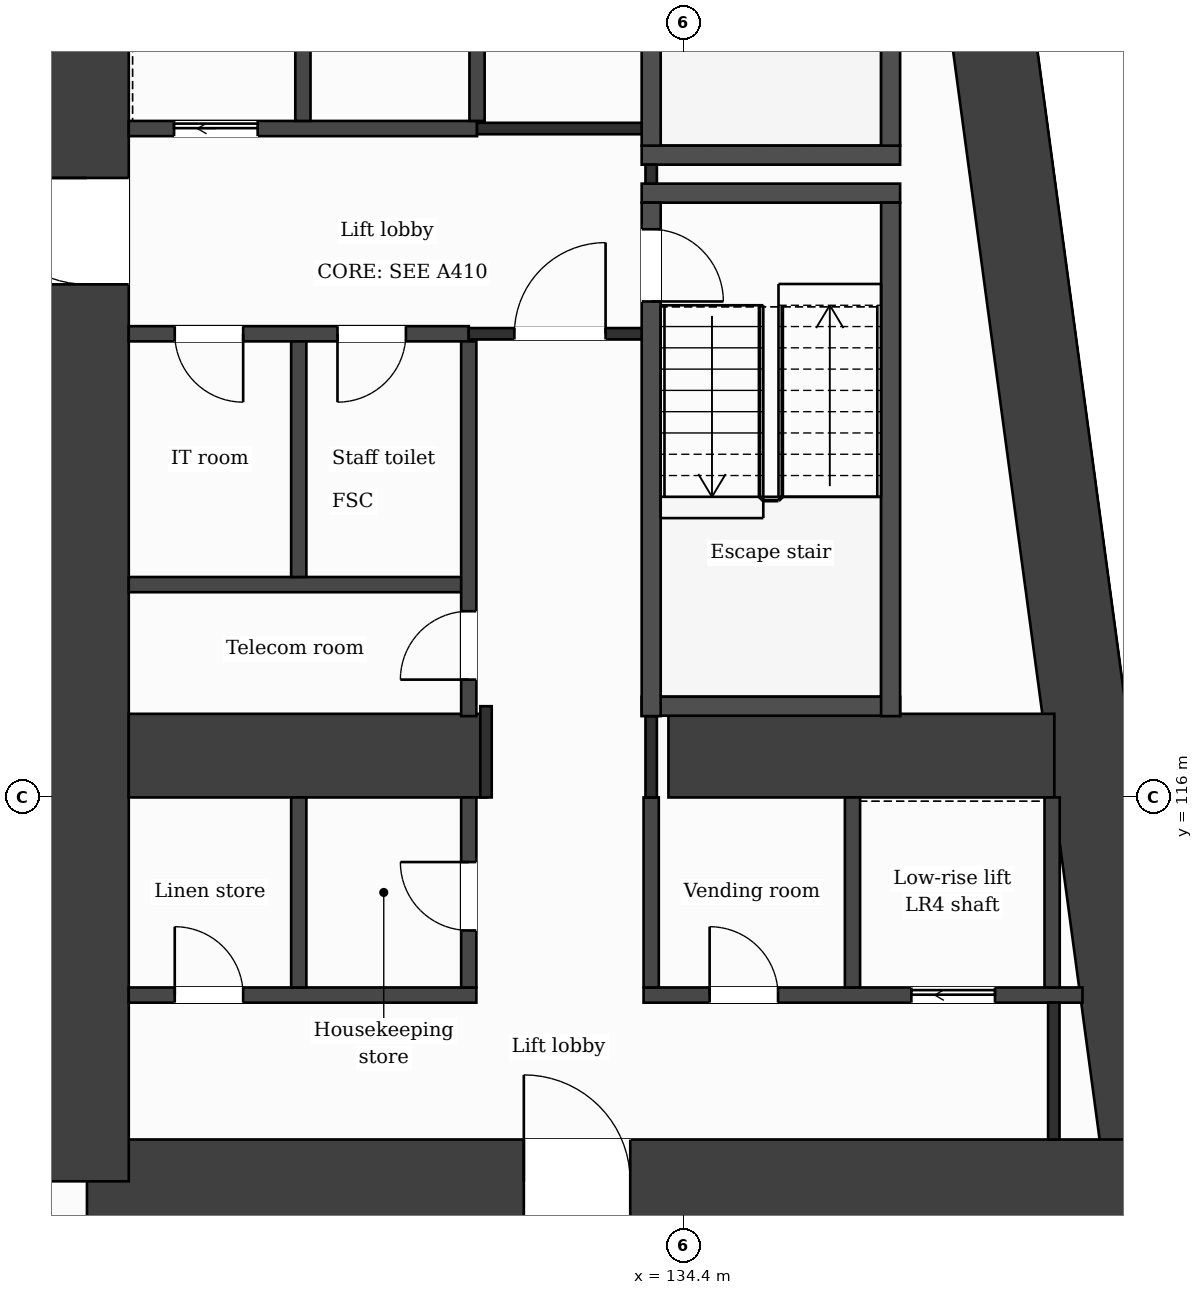
"""IFC4 building model, lengths in metres.
Left out: names, types, materials, properties, quantities, classifications, styles, units other than length and angle.
Written with IfcOpenShell. Run it as: python <this file> out.ifc"""

import sys

from ifc_helpers import new_model, si_unit, direction, frame, frame_2d, origin, place, context, subcontext, project, spatial, rectangle, extrude, element, fill, save


model = new_model("IFC4")
c1 = context("Model", 3, precision=1e-05, world=origin(), true_north=direction((0.0, 1.0)))
c2 = subcontext(c1, "Body", "Model", "MODEL_VIEW")
j1 = project(units=[si_unit("LENGTHUNIT", "METRE"), si_unit("PLANEANGLEUNIT", "RADIAN")], contexts=[c1])
p1 = place(None, origin())
s1 = spatial("IfcSite", under=j1, at=p1, CompositionType="ELEMENT")
p2 = place(p1, origin())
s2 = spatial("IfcBuilding", under=s1, at=p2, CompositionType="ELEMENT")
p3 = place(p2, frame((0.0, 0.0, 49.5)))
s3 = spatial("IfcBuildingStorey", under=s2, at=p3, CompositionType="ELEMENT", Elevation=49.5)
p4 = place(p3, frame((137.688, 131.85, 0.0), z_axis=(0.0, 0.0, 1.0), x_axis=(0.133411793472, -0.991060691059, 0.0)))
e1 = element("IfcWall", 1, at=p4, inside=s3, PredefinedType="SHEAR", context=c2, shape_type="SweptSolid", body=[
    extrude(rectangle(XDim=21.089, YDim=1.1, at=frame_2d((10.544, 0.0))), origin(), (0.0, 0.0, 1.0), 3.5),
])
p5 = place(p3, frame((140.502, 110.95, 0.0), z_axis=(0.0, 0.0, 1.0), x_axis=(-1.0, 0.0, 0.0)))
e2 = element("IfcWall", 2, at=p5, inside=s3, PredefinedType="SHEAR", context=c2, shape_type="SweptSolid", body=[
    extrude(rectangle(XDim=13.952, YDim=1.1, at=frame_2d((6.976, 0.0))), origin(), (0.0, 0.0, 1.0), 3.5),
])
p6 = place(p5, frame((6.804, 0.0, 0.0)))
e3 = element("IfcOpeningElement", 3, at=p6, cuts=e2, PredefinedType="OPENING", context=c2, shape_type="SweptSolid", body=[
    extrude(rectangle(XDim=1.4, YDim=2.1, at=frame_2d((0.7, 1.05))), frame((0.0, 0.56, 0.0), z_axis=(0.0, -1.0, 0.0), x_axis=(1.0, 0.0, 0.0)), (0.0, 0.0, 1.0), 1.12),
])
p7 = place(p3, frame((126.55, 110.95, 0.0), z_axis=(0.0, 0.0, 1.0), x_axis=(0.0, 1.0, 0.0)))
e4 = element("IfcWall", 4, at=p7, inside=s3, PredefinedType="SHEAR", context=c2, shape_type="SweptSolid", body=[
    extrude(rectangle(XDim=20.9, YDim=1.1, at=frame_2d((10.45, 0.0))), origin(), (0.0, 0.0, 1.0), 3.5),
])
p8 = place(p7, frame((11.8, 0.0, 0.0)))
e5 = element("IfcOpeningElement", 5, at=p8, cuts=e4, PredefinedType="OPENING", context=c2, shape_type="SweptSolid", body=[
    extrude(rectangle(XDim=1.4, YDim=2.1, at=frame_2d((0.7, 1.05))), frame((0.0, 0.56, 0.0), z_axis=(0.0, -1.0, 0.0), x_axis=(1.0, 0.0, 0.0)), (0.0, 0.0, 1.0), 1.12),
])
p9 = place(p3, frame((127.1, 116.55, 0.0), z_axis=(0.0, 0.0, 1.0), x_axis=(1.0, 0.0, 0.0)))
e6 = element("IfcWall", 6, at=p9, inside=s3, PredefinedType="SHEAR", context=c2, shape_type="SweptSolid", body=[
    extrude(rectangle(XDim=4.7, YDim=1.1, at=frame_2d((2.35, 0.0))), origin(), (0.0, 0.0, 1.0), 3.5),
])
p10 = place(p3, frame((134.2, 116.55, 0.0), z_axis=(0.0, 0.0, 1.0), x_axis=(1.0, 0.0, 0.0)))
e7 = element("IfcWall", 7, at=p10, inside=s3, PredefinedType="SHEAR", context=c2, shape_type="SweptSolid", body=[
    extrude(rectangle(XDim=5.077, YDim=1.1, at=frame_2d((2.539, 0.0))), origin(), (0.0, 0.0, 1.0), 3.5),
])
p11 = place(p3, frame((127.1, 113.4, 0.0), z_axis=(0.0, 0.0, 1.0), x_axis=(1.0, 0.0, 0.0)))
e8 = element("IfcWall", 8, at=p11, inside=s3, PredefinedType="PARTITIONING", context=c2, shape_type="SweptSolid", body=[
    extrude(rectangle(XDim=4.573, YDim=0.2, at=frame_2d((2.287, 0.0))), origin(), (0.0, 0.0, 1.0), 3.18),
])
p12 = place(p11, frame((0.605, 0.0, 0.0)))
e9 = element("IfcOpeningElement", 9, at=p12, cuts=e8, PredefinedType="OPENING", context=c2, shape_type="SweptSolid", body=[
    extrude(rectangle(XDim=0.9, YDim=2.1, at=frame_2d((0.45, 1.05))), frame((0.0, 0.11, 0.0), z_axis=(0.0, -1.0, 0.0), x_axis=(1.0, 0.0, 0.0)), (0.0, 0.0, 1.0), 0.22),
])
p13 = place(p3, frame((133.873, 113.4, 0.0), z_axis=(0.0, 0.0, 1.0), x_axis=(1.0, 0.0, 0.0)))
e10 = element("IfcWall", 10, at=p13, inside=s3, PredefinedType="PARTITIONING", context=c2, shape_type="SweptSolid", body=[
    extrude(rectangle(XDim=5.774, YDim=0.2, at=frame_2d((2.887, 0.0))), origin(), (0.0, 0.0, 1.0), 3.18),
])
p14 = place(p13, frame((3.523, 0.0, 0.0)))
e11 = element("IfcOpeningElement", 11, at=p14, cuts=e10, PredefinedType="OPENING", context=c2, shape_type="SweptSolid", body=[
    extrude(rectangle(XDim=1.1, YDim=2.1, at=frame_2d((0.55, 1.05))), frame((0.0, 0.11, 0.0), z_axis=(0.0, -1.0, 0.0), x_axis=(1.0, 0.0, 0.0)), (0.0, 0.0, 1.0), 0.22),
])
p15 = place(p13, frame((0.869, 0.0, 0.0)))
e12 = element("IfcOpeningElement", 12, at=p15, cuts=e10, PredefinedType="OPENING", context=c2, shape_type="SweptSolid", body=[
    extrude(rectangle(XDim=0.9, YDim=2.1, at=frame_2d((0.45, 1.05))), frame((0.0, 0.11, 0.0), z_axis=(0.0, -1.0, 0.0), x_axis=(1.0, 0.0, 0.0)), (0.0, 0.0, 1.0), 0.22),
])
p16 = place(p3, frame((133.848, 117.2, 0.0), z_axis=(0.0, 0.0, 1.0), x_axis=(1.0, 0.0, 0.0)))
e13 = element("IfcWall", 13, at=p16, inside=s3, PredefinedType="PARTITIONING", context=c2, shape_type="SweptSolid", body=[
    extrude(rectangle(XDim=3.4, YDim=0.25, at=frame_2d((1.7, 0.0))), origin(), (0.0, 0.0, 1.0), 3.18),
])
p17 = place(p3, frame((127.1, 118.8, 0.0), z_axis=(0.0, 0.0, 1.0), x_axis=(1.0, 0.0, 0.0)))
e14 = element("IfcWall", 14, at=p17, inside=s3, PredefinedType="PARTITIONING", context=c2, shape_type="SweptSolid", body=[
    extrude(rectangle(XDim=4.473, YDim=0.2, at=frame_2d((2.236, 0.0))), origin(), (0.0, 0.0, 1.0), 3.18),
])
p18 = place(p3, frame((127.1, 122.1, 0.0), z_axis=(0.0, 0.0, 1.0), x_axis=(1.0, 0.0, 0.0)))
e15 = element("IfcWall", 15, at=p18, inside=s3, PredefinedType="PARTITIONING", context=c2, shape_type="SweptSolid", body=[
    extrude(rectangle(XDim=4.473, YDim=0.2, at=frame_2d((2.236, 0.0))), origin(), (0.0, 0.0, 1.0), 3.18),
])
p19 = place(p18, frame((2.746, 0.0, 0.0)))
e16 = element("IfcOpeningElement", 16, at=p19, cuts=e15, PredefinedType="OPENING", context=c2, shape_type="SweptSolid", body=[
    extrude(rectangle(XDim=0.9, YDim=2.1, at=frame_2d((0.45, 1.05))), frame((0.0, 0.11, 0.0), z_axis=(0.0, -1.0, 0.0), x_axis=(1.0, 0.0, 0.0)), (0.0, 0.0, 1.0), 0.22),
])
p20 = place(p18, frame((0.605, 0.0, 0.0)))
e17 = element("IfcOpeningElement", 17, at=p20, cuts=e15, PredefinedType="OPENING", context=c2, shape_type="SweptSolid", body=[
    extrude(rectangle(XDim=0.9, YDim=2.1, at=frame_2d((0.45, 1.05))), frame((0.0, 0.11, 0.0), z_axis=(0.0, -1.0, 0.0), x_axis=(1.0, 0.0, 0.0)), (0.0, 0.0, 1.0), 0.22),
])
p21 = place(p3, frame((131.573, 122.1, 0.0), z_axis=(0.0, 0.0, 1.0), x_axis=(1.0, 0.0, 0.0)))
e18 = element("IfcWall", 18, at=p21, inside=s3, PredefinedType="PARTITIONING", context=c2, shape_type="SweptSolid", body=[
    extrude(rectangle(XDim=2.4, YDim=0.15, at=frame_2d((1.2, 0.0))), origin(), (0.0, 0.0, 1.0), 3.18),
])
p22 = place(p21, frame((0.6, 0.0, 0.0)))
e19 = element("IfcOpeningElement", 19, at=p22, cuts=e18, PredefinedType="OPENING", context=c2, shape_type="SweptSolid", body=[
    extrude(rectangle(XDim=1.2, YDim=2.1, at=frame_2d((0.6, 1.05))), frame((0.0, 0.085, 0.0), z_axis=(0.0, -1.0, 0.0), x_axis=(1.0, 0.0, 0.0)), (0.0, 0.0, 1.0), 0.17),
])
for number, where, z_axis, x_axis in (
    (20, (133.848, 123.95, 0.0), (0.0, 0.0, 1.0), (1.0, 0.0, 0.0)),
    (21, (133.848, 124.45, 0.0), (0.0, 0.0, 1.0), (1.0, 0.0, 0.0)),
):
    element("IfcWall", number, at=place(p3, frame(where, z_axis=z_axis, x_axis=x_axis)), inside=s3, PredefinedType="PARTITIONING", context=c2, shape_type="SweptSolid", body=[
        extrude(rectangle(XDim=3.4, YDim=0.25, at=frame_2d((1.7, 0.0))), origin(), (0.0, 0.0, 1.0), 3.18),
    ])
p23 = place(p3, frame((127.1, 124.8, 0.0), z_axis=(0.0, 0.0, 1.0), x_axis=(1.0, 0.0, 0.0)))
e22 = element("IfcWall", 22, at=p23, inside=s3, PredefinedType="PARTITIONING", context=c2, shape_type="SweptSolid", body=[
    extrude(rectangle(XDim=4.582, YDim=0.2, at=frame_2d((2.291, 0.0))), origin(), (0.0, 0.0, 1.0), 3.18),
])
p24 = place(p23, frame((0.596, 0.0, 0.0)))
e23 = element("IfcOpeningElement", 23, at=p24, cuts=e22, PredefinedType="OPENING", context=c2, shape_type="SweptSolid", body=[
    extrude(rectangle(XDim=1.1, YDim=2.1, at=frame_2d((0.55, 1.05))), frame((0.0, 0.11, 0.0), z_axis=(0.0, -1.0, 0.0), x_axis=(1.0, 0.0, 0.0)), (0.0, 0.0, 1.0), 0.22),
])
p25 = place(p3, frame((131.682, 124.8, 0.0), z_axis=(0.0, 0.0, 1.0), x_axis=(1.0, 0.0, 0.0)))
e24 = element("IfcWall", 24, at=p25, inside=s3, PredefinedType="PARTITIONING", context=c2, shape_type="SweptSolid", body=[
    extrude(rectangle(XDim=2.416, YDim=0.15, at=frame_2d((1.208, 0.0))), origin(), (0.0, 0.0, 1.0), 3.18),
])
p26 = place(p3, frame((129.336, 113.5, 0.0), z_axis=(0.0, 0.0, 1.0), x_axis=(0.0, 1.0, 0.0)))
e25 = element("IfcWall", 25, at=p26, inside=s3, PredefinedType="PARTITIONING", context=c2, shape_type="SweptSolid", body=[
    extrude(rectangle(XDim=2.5, YDim=0.2, at=frame_2d((1.25, 0.0))), origin(), (0.0, 0.0, 1.0), 3.18),
])
for number, where, z_axis, x_axis in (
    (26, (129.336, 118.9, 0.0), (0.0, 0.0, 1.0), (0.0, 1.0, 0.0)),
    (27, (129.391, 124.9, 0.0), (0.0, 0.0, 1.0), (0.0, 1.0, 0.0)),
):
    element("IfcWall", number, at=place(p3, frame(where, z_axis=z_axis, x_axis=x_axis)), inside=s3, PredefinedType="PARTITIONING", context=c2, shape_type="SweptSolid", body=[
        extrude(rectangle(XDim=3.1, YDim=0.2, at=frame_2d((1.55, 0.0))), origin(), (0.0, 0.0, 1.0), 3.18),
    ])
p27 = place(p3, frame((131.573, 113.5, 0.0), z_axis=(0.0, 0.0, 1.0), x_axis=(0.0, 1.0, 0.0)))
e28 = element("IfcWall", 28, at=p27, inside=s3, PredefinedType="PARTITIONING", context=c2, shape_type="SweptSolid", body=[
    extrude(rectangle(XDim=2.5, YDim=0.2, at=frame_2d((1.25, 0.0))), origin(), (0.0, 0.0, 1.0), 3.18),
])
p28 = place(p27, frame((0.75, 0.0, 0.0)))
e29 = element("IfcOpeningElement", 29, at=p28, cuts=e28, PredefinedType="OPENING", context=c2, shape_type="SweptSolid", body=[
    extrude(rectangle(XDim=0.9, YDim=2.1, at=frame_2d((0.45, 1.05))), frame((0.0, 0.11, 0.0), z_axis=(0.0, -1.0, 0.0), x_axis=(1.0, 0.0, 0.0)), (0.0, 0.0, 1.0), 0.22),
])
p29 = place(p3, frame((131.573, 117.07, 0.0), z_axis=(0.0, 0.0, 1.0), x_axis=(0.0, 1.0, 0.0)))
e30 = element("IfcWall", 30, at=p29, inside=s3, PredefinedType="PARTITIONING", context=c2, shape_type="SweptSolid", body=[
    extrude(rectangle(XDim=4.93, YDim=0.2, at=frame_2d((2.465, 0.0))), origin(), (0.0, 0.0, 1.0), 3.18),
])
p30 = place(p29, frame((0.48, 0.0, 0.0)))
e31 = element("IfcOpeningElement", 31, at=p30, cuts=e30, PredefinedType="OPENING", context=c2, shape_type="SweptSolid", body=[
    extrude(rectangle(XDim=0.9, YDim=2.1, at=frame_2d((0.45, 1.05))), frame((0.0, 0.11, 0.0), z_axis=(0.0, -1.0, 0.0), x_axis=(1.0, 0.0, 0.0)), (0.0, 0.0, 1.0), 0.22),
])
p31 = place(p3, frame((131.682, 124.9, 0.0), z_axis=(0.0, 0.0, 1.0), x_axis=(0.0, 1.0, 0.0)))
e32 = element("IfcWall", 32, at=p31, inside=s3, PredefinedType="PARTITIONING", context=c2, shape_type="SweptSolid", body=[
    extrude(rectangle(XDim=3.1, YDim=0.2, at=frame_2d((1.55, 0.0))), origin(), (0.0, 0.0, 1.0), 3.18),
])
p32 = place(p3, frame((131.8, 116.0, 0.0), z_axis=(0.0, 0.0, 1.0), x_axis=(0.0, 1.0, 0.0)))
e33 = element("IfcWall", 33, at=p32, inside=s3, PredefinedType="PARTITIONING", context=c2, shape_type="SweptSolid", body=[
    extrude(rectangle(XDim=1.2, YDim=0.15, at=frame_2d((0.6, 0.0))), origin(), (0.0, 0.0, 1.0), 3.18),
])
p33 = place(p3, frame((133.973, 113.5, 0.0), z_axis=(0.0, 0.0, 1.0), x_axis=(0.0, 1.0, 0.0)))
e34 = element("IfcWall", 34, at=p33, inside=s3, PredefinedType="PARTITIONING", context=c2, shape_type="SweptSolid", body=[
    extrude(rectangle(XDim=2.5, YDim=0.2, at=frame_2d((1.25, 0.0))), origin(), (0.0, 0.0, 1.0), 3.18),
])
p34 = place(p3, frame((133.973, 116.0, 0.0), z_axis=(0.0, 0.0, 1.0), x_axis=(0.0, 1.0, 0.0)))
e35 = element("IfcWall", 35, at=p34, inside=s3, PredefinedType="PARTITIONING", context=c2, shape_type="SweptSolid", body=[
    extrude(rectangle(XDim=1.07, YDim=0.15, at=frame_2d((0.535, 0.0))), origin(), (0.0, 0.0, 1.0), 3.18),
])
p35 = place(p3, frame((133.973, 124.075, 0.0), z_axis=(0.0, 0.0, 1.0), x_axis=(0.0, 1.0, 0.0)))
e36 = element("IfcWall", 36, at=p35, inside=s3, PredefinedType="PARTITIONING", context=c2, shape_type="SweptSolid", body=[
    extrude(rectangle(XDim=0.25, YDim=0.15, at=frame_2d((0.125, 0.0))), origin(), (0.0, 0.0, 1.0), 3.18),
])
p36 = place(p3, frame((133.973, 117.07, 0.0), z_axis=(0.0, 0.0, 1.0), x_axis=(0.0, 1.0, 0.0)))
e37 = element("IfcWall", 37, at=p36, inside=s3, PredefinedType="PARTITIONING", context=c2, shape_type="SweptSolid", body=[
    extrude(rectangle(XDim=6.755, YDim=0.25, at=frame_2d((3.377, 0.0))), origin(), (0.0, 0.0, 1.0), 3.18),
])
p37 = place(p36, frame((5.455, 0.0, 0.0)))
e38 = element("IfcOpeningElement", 38, at=p37, cuts=e37, PredefinedType="OPENING", context=c2, shape_type="SweptSolid", body=[
    extrude(rectangle(XDim=0.95, YDim=2.1, at=frame_2d((0.475, 1.05))), frame((0.0, 0.135, 0.0), z_axis=(0.0, -1.0, 0.0), x_axis=(1.0, 0.0, 0.0)), (0.0, 0.0, 1.0), 0.27),
])
p38 = place(p3, frame((133.973, 124.575, 0.0), z_axis=(0.0, 0.0, 1.0), x_axis=(0.0, 1.0, 0.0)))
e39 = element("IfcWall", 39, at=p38, inside=s3, PredefinedType="PARTITIONING", context=c2, shape_type="SweptSolid", body=[
    extrude(rectangle(XDim=6.755, YDim=0.25, at=frame_2d((3.377, 0.0))), origin(), (0.0, 0.0, 1.0), 3.18),
])
p39 = place(p38, frame((5.325, 0.0, 0.0)))
e40 = element("IfcOpeningElement", 40, at=p39, cuts=e39, PredefinedType="OPENING", context=c2, shape_type="SweptSolid", body=[
    extrude(rectangle(XDim=1.0, YDim=2.1, at=frame_2d((0.5, 1.05))), frame((0.0, 0.135, 0.0), z_axis=(0.0, -1.0, 0.0), x_axis=(1.0, 0.0, 0.0)), (0.0, 0.0, 1.0), 0.27),
])
p40 = place(p3, frame((136.622, 113.5, 0.0), z_axis=(0.0, 0.0, 1.0), x_axis=(0.0, 1.0, 0.0)))
e41 = element("IfcWall", 41, at=p40, inside=s3, PredefinedType="PARTITIONING", context=c2, shape_type="SweptSolid", body=[
    extrude(rectangle(XDim=2.5, YDim=0.2, at=frame_2d((1.25, 0.0))), origin(), (0.0, 0.0, 1.0), 3.18),
])
p41 = place(p3, frame((137.123, 117.07, 0.0), z_axis=(0.0, 0.0, 1.0), x_axis=(0.0, 1.0, 0.0)))
e42 = element("IfcWall", 42, at=p41, inside=s3, PredefinedType="PARTITIONING", context=c2, shape_type="SweptSolid", body=[
    extrude(rectangle(XDim=6.755, YDim=0.25, at=frame_2d((3.377, 0.0))), origin(), (0.0, 0.0, 1.0), 3.18),
])
p42 = place(p3, frame((137.123, 124.575, 0.0), z_axis=(0.0, 0.0, 1.0), x_axis=(0.0, 1.0, 0.0)))
e43 = element("IfcWall", 43, at=p42, inside=s3, PredefinedType="PARTITIONING", context=c2, shape_type="SweptSolid", body=[
    extrude(rectangle(XDim=6.5, YDim=0.25, at=frame_2d((3.25, 0.0))), origin(), (0.0, 0.0, 1.0), 3.18),
])
p43 = place(p3, frame((139.248, 113.5, 0.0), z_axis=(0.0, 0.0, 1.0), x_axis=(0.0, 1.0, 0.0)))
e44 = element("IfcWall", 44, at=p43, inside=s3, PredefinedType="PARTITIONING", context=c2, shape_type="SweptSolid", body=[
    extrude(rectangle(XDim=2.5, YDim=0.2, at=frame_2d((1.25, 0.0))), origin(), (0.0, 0.0, 1.0), 3.18),
])
p44 = place(p3, frame((139.27, 111.5, 0.0), z_axis=(0.0, 0.0, 1.0), x_axis=(0.0, 1.0, 0.0)))
e45 = element("IfcWall", 45, at=p44, inside=s3, PredefinedType="PARTITIONING", context=c2, shape_type="SweptSolid", body=[
    extrude(rectangle(XDim=1.8, YDim=0.15, at=frame_2d((0.9, 0.0))), origin(), (0.0, 0.0, 1.0), 3.18),
])
p45 = place(p22, origin())
e46 = element("IfcDoor", 46, at=p45, inside=s3, OperationType="SINGLE_SWING_RIGHT", PredefinedType="DOOR", context=c2, shape_type="SweptSolid", body=[
    extrude(rectangle(XDim=1.2, YDim=2.1, at=frame_2d((0.6, 1.05))), frame((0.0, 0.025, 0.0), z_axis=(0.0, -1.0, 0.0), x_axis=(1.0, 0.0, 0.0)), (0.0, 0.0, 1.0), 0.05),
])
fill(e19, e46)
p46 = place(p24, origin())
e47 = element("IfcDoor", 47, at=p46, inside=s3, OperationType="SLIDING_TO_LEFT", PredefinedType="DOOR", context=c2, shape_type="SweptSolid", body=[
    extrude(rectangle(XDim=1.1, YDim=2.1, at=frame_2d((0.55, 1.05))), frame((0.0, 0.025, 0.0), z_axis=(0.0, -1.0, 0.0), x_axis=(1.0, 0.0, 0.0)), (0.0, 0.0, 1.0), 0.05),
])
fill(e23, e47)
p47 = place(p19, origin())
e48 = element("IfcDoor", 48, at=p47, inside=s3, OperationType="SINGLE_SWING_LEFT", PredefinedType="DOOR", context=c2, shape_type="SweptSolid", body=[
    extrude(rectangle(XDim=0.9, YDim=2.1, at=frame_2d((0.45, 1.05))), frame((0.0, 0.025, 0.0), z_axis=(0.0, -1.0, 0.0), x_axis=(1.0, 0.0, 0.0)), (0.0, 0.0, 1.0), 0.05),
])
fill(e16, e48)
p48 = place(p20, origin())
e49 = element("IfcDoor", 49, at=p48, inside=s3, OperationType="SINGLE_SWING_RIGHT", PredefinedType="DOOR", context=c2, shape_type="SweptSolid", body=[
    extrude(rectangle(XDim=0.9, YDim=2.1, at=frame_2d((0.45, 1.05))), frame((0.0, 0.025, 0.0), z_axis=(0.0, -1.0, 0.0), x_axis=(1.0, 0.0, 0.0)), (0.0, 0.0, 1.0), 0.05),
])
fill(e17, e49)
p49 = place(p37, origin())
e50 = element("IfcDoor", 50, at=p49, inside=s3, OperationType="SINGLE_SWING_LEFT", PredefinedType="DOOR", context=c2, shape_type="SweptSolid", body=[
    extrude(rectangle(XDim=0.95, YDim=2.1, at=frame_2d((0.475, 1.05))), frame((0.0, 0.025, 0.0), z_axis=(0.0, -1.0, 0.0), x_axis=(1.0, 0.0, 0.0)), (0.0, 0.0, 1.0), 0.05),
])
fill(e38, e50)
p50 = place(p30, origin())
e51 = element("IfcDoor", 51, at=p50, inside=s3, OperationType="SINGLE_SWING_LEFT", PredefinedType="DOOR", context=c2, shape_type="SweptSolid", body=[
    extrude(rectangle(XDim=0.9, YDim=2.1, at=frame_2d((0.45, 1.05))), frame((0.0, 0.025, 0.0), z_axis=(0.0, -1.0, 0.0), x_axis=(1.0, 0.0, 0.0)), (0.0, 0.0, 1.0), 0.05),
])
fill(e31, e51)
p51 = place(p14, origin())
e52 = element("IfcDoor", 52, at=p51, inside=s3, OperationType="SLIDING_TO_LEFT", PredefinedType="DOOR", context=c2, shape_type="SweptSolid", body=[
    extrude(rectangle(XDim=1.1, YDim=2.1, at=frame_2d((0.55, 1.05))), frame((0.0, 0.025, 0.0), z_axis=(0.0, -1.0, 0.0), x_axis=(1.0, 0.0, 0.0)), (0.0, 0.0, 1.0), 0.05),
])
fill(e11, e52)
p52 = place(p15, origin())
e53 = element("IfcDoor", 53, at=p52, inside=s3, OperationType="SINGLE_SWING_LEFT", PredefinedType="DOOR", context=c2, shape_type="SweptSolid", body=[
    extrude(rectangle(XDim=0.9, YDim=2.1, at=frame_2d((0.45, 1.05))), frame((0.0, 0.025, 0.0), z_axis=(0.0, -1.0, 0.0), x_axis=(1.0, 0.0, 0.0)), (0.0, 0.0, 1.0), 0.05),
])
fill(e12, e53)
p53 = place(p28, origin())
e54 = element("IfcDoor", 54, at=p53, inside=s3, OperationType="SINGLE_SWING_RIGHT", PredefinedType="DOOR", context=c2, shape_type="SweptSolid", body=[
    extrude(rectangle(XDim=0.9, YDim=2.1, at=frame_2d((0.45, 1.05))), frame((0.0, 0.025, 0.0), z_axis=(0.0, -1.0, 0.0), x_axis=(1.0, 0.0, 0.0)), (0.0, 0.0, 1.0), 0.05),
])
fill(e29, e54)
p54 = place(p12, origin())
e55 = element("IfcDoor", 55, at=p54, inside=s3, OperationType="SINGLE_SWING_LEFT", PredefinedType="DOOR", context=c2, shape_type="SweptSolid", body=[
    extrude(rectangle(XDim=0.9, YDim=2.1, at=frame_2d((0.45, 1.05))), frame((0.0, 0.025, 0.0), z_axis=(0.0, -1.0, 0.0), x_axis=(1.0, 0.0, 0.0)), (0.0, 0.0, 1.0), 0.05),
])
fill(e9, e55)
p55 = place(p6, origin())
e56 = element("IfcDoor", 56, at=p55, inside=s3, OperationType="SINGLE_SWING_RIGHT", PredefinedType="DOOR", context=c2, shape_type="SweptSolid", body=[
    extrude(rectangle(XDim=1.4, YDim=2.1, at=frame_2d((0.7, 1.05))), frame((0.0, 0.025, 0.0), z_axis=(0.0, -1.0, 0.0), x_axis=(1.0, 0.0, 0.0)), (0.0, 0.0, 1.0), 0.05),
])
fill(e3, e56)
p56 = place(p8, origin())
e57 = element("IfcDoor", 57, at=p56, inside=s3, OperationType="SINGLE_SWING_RIGHT", PredefinedType="DOOR", context=c2, shape_type="SweptSolid", body=[
    extrude(rectangle(XDim=1.4, YDim=2.1, at=frame_2d((0.7, 1.05))), frame((0.0, 0.025, 0.0), z_axis=(0.0, -1.0, 0.0), x_axis=(1.0, 0.0, 0.0)), (0.0, 0.0, 1.0), 0.05),
])
fill(e5, e57)
save(model, sys.argv[1])
